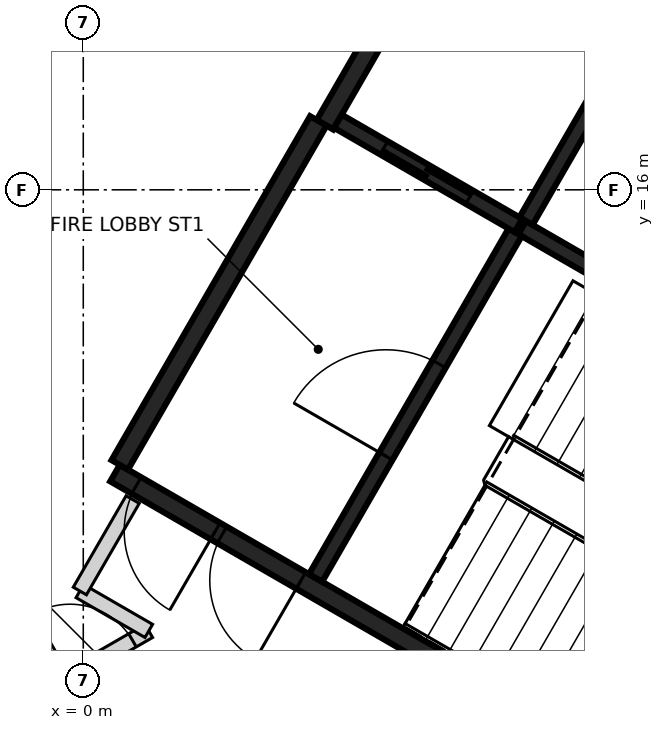
"""IFC4 building model, lengths in metres.
Left out: names, types, materials, properties, quantities, classifications, styles, units other than length and angle.
Written with IfcOpenShell. Run it as: python <this file> out.ifc"""

import sys

from ifc_helpers import new_model, si_unit, direction, frame, frame_2d, origin, place, context, subcontext, project, spatial, rectangle, extrude, element, fill, save


model = new_model("IFC4")
c1 = context("Model", 3, precision=1e-05, world=origin(), true_north=direction((0.0, 1.0)))
c2 = subcontext(c1, "Body", "Model", "MODEL_VIEW")
j1 = project(units=[si_unit("LENGTHUNIT", "METRE"), si_unit("PLANEANGLEUNIT", "RADIAN")], contexts=[c1])
p1 = place(None, origin())
s1 = spatial("IfcSite", under=j1, at=p1, CompositionType="ELEMENT")
p2 = place(p1, origin())
s2 = spatial("IfcBuilding", under=s1, at=p2, CompositionType="ELEMENT")
p3 = place(p2, frame((0.0, 0.0, 154.0)))
s3 = spatial("IfcBuildingStorey", under=s2, at=p3, CompositionType="ELEMENT", Elevation=154.0)
p4 = place(p3, frame((10.42, 6.498, 0.0), z_axis=(0.0, 0.0, 1.0), x_axis=(-0.866021906294, 0.500006057782, 0.0)))
e1 = element("IfcWall", 1, at=p4, inside=s3, PredefinedType="SHEAR", context=c2, shape_type="SweptSolid", body=[
    extrude(rectangle(XDim=11.55, YDim=0.25, at=frame_2d((5.775, 0.0))), origin(), (0.0, 0.0, 1.0), 3.2),
])
p5 = place(p4, frame((10.025, 0.0, 0.0)))
e2 = element("IfcOpeningElement", 2, at=p5, cuts=e1, PredefinedType="OPENING", context=c2, shape_type="SweptSolid", body=[
    extrude(rectangle(XDim=1.2, YDim=2.1, at=frame_2d((0.6, 1.05))), frame((0.0, 0.135, 0.0), z_axis=(0.0, -1.0, 0.0), x_axis=(1.0, 0.0, 0.0)), (0.0, 0.0, 1.0), 0.27),
])
p6 = place(p4, frame((8.725, 0.0, 0.0)))
e3 = element("IfcOpeningElement", 3, at=p6, cuts=e1, PredefinedType="OPENING", context=c2, shape_type="SweptSolid", body=[
    extrude(rectangle(XDim=1.2, YDim=2.1, at=frame_2d((0.6, 1.05))), frame((0.0, 0.135, 0.0), z_axis=(0.0, -1.0, 0.0), x_axis=(1.0, 0.0, 0.0)), (0.0, 0.0, 1.0), 0.27),
])
p7 = place(p3, frame((3.179, 16.856, 0.0), z_axis=(0.0, 0.0, 1.0), x_axis=(0.500004234368, 0.866022959057, 0.0)))
e4 = element("IfcWall", 4, at=p7, inside=s3, PredefinedType="SHEAR", context=c2, shape_type="SweptSolid", body=[
    extrude(rectangle(XDim=6.25, YDim=0.25, at=frame_2d((3.125, 0.0))), origin(), (0.0, 0.0, 1.0), 3.2),
])
p8 = place(p3, frame((0.48, 12.381, 0.0), z_axis=(0.0, 0.0, 1.0), x_axis=(0.49999885962, 0.866026062182, 0.0)))
e5 = element("IfcWall", 5, at=p8, inside=s3, PredefinedType="SHEAR", context=c2, shape_type="SweptSolid", body=[
    extrude(rectangle(XDim=5.225, YDim=0.25, at=frame_2d((2.612, 0.0))), origin(), (0.0, 0.0, 1.0), 3.2),
])
p9 = place(p3, frame((5.775, 15.502, 0.0), z_axis=(0.0, 0.0, 1.0), x_axis=(0.866020080793, -0.500009219579, 0.0)))
e6 = element("IfcWall", 6, at=p9, inside=s3, PredefinedType="SHEAR", context=c2, shape_type="SweptSolid", body=[
    extrude(rectangle(XDim=5.699, YDim=0.2, at=frame_2d((2.85, 0.0))), origin(), (0.0, 0.0, 1.0), 3.2),
])
p10 = place(p3, frame((3.057, 10.895, 0.0), z_axis=(0.0, 0.0, 1.0), x_axis=(0.499989418164, 0.866031513124, 0.0)))
e7 = element("IfcWall", 7, at=p10, inside=s3, PredefinedType="SHEAR", context=c2, shape_type="SweptSolid", body=[
    extrude(rectangle(XDim=5.251, YDim=0.2, at=frame_2d((2.625, 0.0))), origin(), (0.0, 0.0, 1.0), 3.2),
])
p11 = place(p10, frame((1.849, 0.0, 0.0)))
e8 = element("IfcOpeningElement", 8, at=p11, cuts=e7, PredefinedType="OPENING", context=c2, shape_type="SweptSolid", body=[
    extrude(rectangle(XDim=1.4, YDim=2.1, at=frame_2d((0.7, 1.05))), frame((0.0, 0.11, 0.0), z_axis=(0.0, -1.0, 0.0), x_axis=(1.0, 0.0, 0.0)), (0.0, 0.0, 1.0), 0.22),
])
p12 = place(p3, frame((7.199, 17.97, 0.0), z_axis=(0.0, 0.0, 1.0), x_axis=(-0.499968400327, -0.866043647095, 0.0)))
e9 = element("IfcWall", 9, at=p12, inside=s3, PredefinedType="SHEAR", context=c2, shape_type="SweptSolid", body=[
    extrude(rectangle(XDim=2.75, YDim=0.2, at=frame_2d((1.375, 0.0))), origin(), (0.0, 0.0, 1.0), 3.2),
])
p13 = place(p3, frame((5.725, 15.531, 0.0), z_axis=(0.0, 0.0, 1.0), x_axis=(-0.866037306777, 0.499979382845, 0.0)))
e10 = element("IfcWall", 10, at=p13, inside=s3, PredefinedType="SHEAR", context=c2, shape_type="SweptSolid", body=[
    extrude(rectangle(XDim=2.742, YDim=0.2, at=frame_2d((1.371, 0.0))), origin(), (0.0, 0.0, 1.0), 3.2),
])
p14 = place(p13, frame((0.743, 0.0, 0.0)))
e11 = element("IfcOpeningElement", 11, at=p14, cuts=e10, PredefinedType="OPENING", context=c2, shape_type="SweptSolid", body=[
    extrude(rectangle(XDim=1.3, YDim=2.1, at=frame_2d((0.65, 1.05))), frame((0.0, 0.11, 0.0), z_axis=(0.0, -1.0, 0.0), x_axis=(1.0, 0.0, 0.0)), (0.0, 0.0, 1.0), 0.22),
])
p15 = place(p3, frame((-6.976, 5.674, 0.0), z_axis=(0.0, 0.0, 1.0), x_axis=(0.8661469583, 0.499789402276, 0.0)))
e12 = element("IfcWall", 12, at=p15, inside=s3, PredefinedType="PARTITIONING", context=c2, shape_type="SweptSolid", body=[
    extrude(rectangle(XDim=9.05, YDim=0.2, at=frame_2d((4.525, 0.0))), origin(), (0.0, 0.0, 1.0), 3.2),
])
p16 = place(p15, frame((7.852, 0.0, 0.0)))
e13 = element("IfcOpeningElement", 13, at=p16, cuts=e12, PredefinedType="OPENING", context=c2, shape_type="SweptSolid", body=[
    extrude(rectangle(XDim=0.95, YDim=2.1, at=frame_2d((0.475, 1.05))), frame((0.0, 0.11, 0.0), z_axis=(0.0, -1.0, 0.0), x_axis=(1.0, 0.0, 0.0)), (0.0, 0.0, 1.0), 0.22),
])
p17 = place(p15, frame((2.923, 0.0, 0.0)))
e14 = element("IfcOpeningElement", 14, at=p17, cuts=e12, PredefinedType="OPENING", context=c2, shape_type="SweptSolid", body=[
    extrude(rectangle(XDim=0.95, YDim=2.1, at=frame_2d((0.475, 1.05))), frame((0.0, 0.11, 0.0), z_axis=(0.0, -1.0, 0.0), x_axis=(1.0, 0.0, 0.0)), (0.0, 0.0, 1.0), 0.22),
])
p18 = place(p3, frame((-0.045, 10.721, 0.0), z_axis=(0.0, 0.0, 1.0), x_axis=(0.865909943543, -0.500199929702, 0.0)))
e15 = element("IfcWall", 15, at=p18, inside=s3, PredefinedType="PARTITIONING", context=c2, shape_type="SweptSolid", body=[
    extrude(rectangle(XDim=1.047, YDim=0.2, at=frame_2d((0.524, 0.0))), origin(), (0.0, 0.0, 1.0), 3.2),
])
p19 = place(p3, frame((-0.045, 10.722, 0.0), z_axis=(0.0, 0.0, 1.0), x_axis=(0.500107785535, 0.865963164833, 0.0)))
e16 = element("IfcWall", 16, at=p19, inside=s3, PredefinedType="PARTITIONING", context=c2, shape_type="SweptSolid", body=[
    extrude(rectangle(XDim=1.389, YDim=0.2, at=frame_2d((0.695, 0.0))), origin(), (0.0, 0.0, 1.0), 3.2),
])
p20 = place(p14, origin())
e17 = element("IfcDoor", 17, at=p20, inside=s3, OperationType="SLIDING_TO_RIGHT", PredefinedType="DOOR", context=c2, shape_type="SweptSolid", body=[
    extrude(rectangle(XDim=1.3, YDim=2.1, at=frame_2d((0.65, 1.05))), frame((0.0, 0.025, 0.0), z_axis=(0.0, -1.0, 0.0), x_axis=(1.0, 0.0, 0.0)), (0.0, 0.0, 1.0), 0.05),
])
fill(e11, e17)
p21 = place(p5, origin())
e18 = element("IfcDoor", 18, at=p21, inside=s3, OperationType="SINGLE_SWING_LEFT", PredefinedType="DOOR", context=c2, shape_type="SweptSolid", body=[
    extrude(rectangle(XDim=1.2, YDim=2.1, at=frame_2d((0.6, 1.05))), frame((0.0, 0.025, 0.0), z_axis=(0.0, -1.0, 0.0), x_axis=(1.0, 0.0, 0.0)), (0.0, 0.0, 1.0), 0.05),
])
fill(e2, e18)
p22 = place(p6, origin())
e19 = element("IfcDoor", 19, at=p22, inside=s3, OperationType="SINGLE_SWING_RIGHT", PredefinedType="DOOR", context=c2, shape_type="SweptSolid", body=[
    extrude(rectangle(XDim=1.2, YDim=2.1, at=frame_2d((0.6, 1.05))), frame((0.0, 0.025, 0.0), z_axis=(0.0, -1.0, 0.0), x_axis=(1.0, 0.0, 0.0)), (0.0, 0.0, 1.0), 0.05),
])
fill(e3, e19)
p23 = place(p11, origin())
e20 = element("IfcDoor", 20, at=p23, inside=s3, OperationType="SINGLE_SWING_RIGHT", PredefinedType="DOOR", context=c2, shape_type="SweptSolid", body=[
    extrude(rectangle(XDim=1.4, YDim=2.1, at=frame_2d((0.7, 1.05))), frame((0.0, 0.025, 0.0), z_axis=(0.0, -1.0, 0.0), x_axis=(1.0, 0.0, 0.0)), (0.0, 0.0, 1.0), 0.05),
])
fill(e8, e20)
p24 = place(p16, origin())
e21 = element("IfcDoor", 21, at=p24, inside=s3, OperationType="SINGLE_SWING_LEFT", PredefinedType="DOOR", context=c2, shape_type="SweptSolid", body=[
    extrude(rectangle(XDim=0.95, YDim=2.1, at=frame_2d((0.475, 1.05))), frame((0.0, 0.025, 0.0), z_axis=(0.0, -1.0, 0.0), x_axis=(1.0, 0.0, 0.0)), (0.0, 0.0, 1.0), 0.05),
])
fill(e13, e21)
save(model, sys.argv[1])
